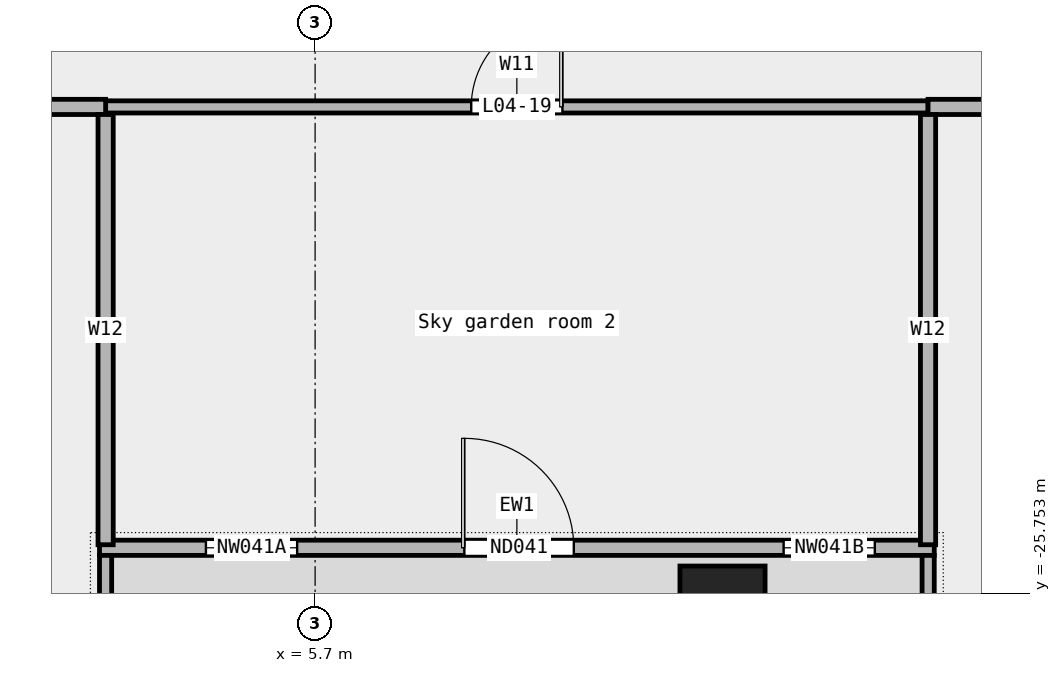
"""IFC4 building model, lengths in metres.
Left out: names, types, materials, properties, quantities, classifications, styles, units other than length and angle.
Written with IfcOpenShell. Run it as: python <this file> out.ifc"""

import sys

from ifc_helpers import new_model, si_unit, direction, frame, frame_2d, origin, origin_2d, place, context, subcontext, project, spatial, rectangle, extrude, element, fill, save


model = new_model("IFC4")
c1 = context("Model", 3, precision=1e-05, world=origin(), true_north=direction((0.0, 1.0)))
c2 = subcontext(c1, "Body", "Model", "MODEL_VIEW")
j1 = project(units=[si_unit("LENGTHUNIT", "METRE"), si_unit("PLANEANGLEUNIT", "RADIAN")], contexts=[c1])
p1 = place(None, origin())
s1 = spatial("IfcSite", under=j1, at=p1, CompositionType="ELEMENT")
p2 = place(p1, origin())
s2 = spatial("IfcBuilding", under=s1, at=p2, CompositionType="ELEMENT")
p3 = place(p2, frame((0.0, 0.0, 25.5)))
s3 = spatial("IfcBuildingStorey", under=s2, at=p3, CompositionType="ELEMENT", Elevation=25.5)
p4 = place(p3, frame((12.4, -26.0, 0.0), z_axis=(0.0, 0.0, 1.0), x_axis=(1.0, 0.0, 0.0)))
e1 = element("IfcColumn", 1, at=p4, inside=s3, PredefinedType="COLUMN", context=c2, shape_type="SweptSolid", body=[
    extrude(rectangle(XDim=1.4, YDim=1.4, at=origin_2d()), origin(), (0.0, 0.0, 1.0), 5.05),
])
p5 = place(p3, frame((2.155, -25.0, 0.0), z_axis=(0.0, 0.0, 1.0), x_axis=(1.0, 0.0, 0.0)))
e2 = element("IfcWall", 2, at=p5, inside=s3, PredefinedType="STANDARD", context=c2, shape_type="SweptSolid", body=[
    extrude(rectangle(XDim=13.727, YDim=0.25, at=frame_2d((6.864, 0.0))), origin(), (0.0, 0.0, 1.0), 5.05),
])
p6 = place(p5, frame((1.75, 0.0, 0.45)))
e3 = element("IfcOpeningElement", 3, at=p6, cuts=e2, PredefinedType="OPENING", context=c2, shape_type="SweptSolid", body=[
    extrude(rectangle(XDim=1.5, YDim=3.0, at=frame_2d((0.75, 1.5))), frame((0.0, 0.137, 0.0), z_axis=(0.0, -1.0, 0.0), x_axis=(1.0, 0.0, 0.0)), (0.0, 0.0, 1.0), 0.274),
])
p7 = place(p5, frame((6.0, 0.0, 0.0)))
e4 = element("IfcOpeningElement", 4, at=p7, cuts=e2, PredefinedType="OPENING", context=c2, shape_type="SweptSolid", body=[
    extrude(rectangle(XDim=1.8, YDim=2.4, at=frame_2d((0.9, 1.2))), frame((0.0, 0.137, 0.0), z_axis=(0.0, -1.0, 0.0), x_axis=(1.0, 0.0, 0.0)), (0.0, 0.0, 1.0), 0.274),
])
p8 = place(p5, frame((11.25, 0.0, 0.45)))
e5 = element("IfcOpeningElement", 5, at=p8, cuts=e2, PredefinedType="OPENING", context=c2, shape_type="SweptSolid", body=[
    extrude(rectangle(XDim=1.5, YDim=3.0, at=frame_2d((0.75, 1.5))), frame((0.0, 0.137, 0.0), z_axis=(0.0, -1.0, 0.0), x_axis=(1.0, 0.0, 0.0)), (0.0, 0.0, 1.0), 0.274),
])
for number, where, z_axis, x_axis in (
    (6, (2.255, -27.0, 0.0), (0.0, 0.0, 1.0), (0.0, 1.0, 0.0)),
    (7, (15.782, -27.0, 0.0), (0.0, 0.0, 1.0), (0.0, 1.0, 0.0)),
):
    element("IfcWall", number, at=place(p3, frame(where, z_axis=z_axis, x_axis=x_axis)), inside=s3, PredefinedType="STANDARD", context=c2, shape_type="SweptSolid", body=[
        extrude(rectangle(XDim=1.875, YDim=0.2, at=frame_2d((0.938, 0.0))), origin(), (0.0, 0.0, 1.0), 5.05),
    ])
p9 = place(p3, frame((2.255, -17.75, 0.0), z_axis=(0.0, 0.0, 1.0), x_axis=(1.0, 0.0, 0.0)))
e8 = element("IfcWall", 8, at=p9, inside=s3, PredefinedType="PARTITIONING", context=c2, shape_type="SweptSolid", body=[
    extrude(rectangle(XDim=13.525, YDim=0.2, at=frame_2d((6.763, 0.0))), origin(), (0.0, 0.0, 1.0), 5.05),
])
p10 = place(p9, frame((6.012, 0.0, 0.0)))
e9 = element("IfcOpeningElement", 9, at=p10, cuts=e8, PredefinedType="OPENING", context=c2, shape_type="SweptSolid", body=[
    extrude(rectangle(XDim=1.5, YDim=2.1, at=frame_2d((0.75, 1.05))), frame((0.0, 0.112, 0.0), z_axis=(0.0, -1.0, 0.0), x_axis=(1.0, 0.0, 0.0)), (0.0, 0.0, 1.0), 0.224),
])
p11 = place(p3, frame((-30.75, -17.75, 0.0), z_axis=(0.0, 0.0, 1.0), x_axis=(1.0, 0.0, 0.0)))
e10 = element("IfcWall", 10, at=p11, inside=s3, PredefinedType="PARTITIONING", context=c2, shape_type="SweptSolid", body=[
    extrude(rectangle(XDim=33.005, YDim=0.25, at=frame_2d((16.502, 0.0))), origin(), (0.0, 0.0, 1.0), 5.05),
])
p12 = place(p11, frame((27.752, 0.0, 0.0)))
e11 = element("IfcOpeningElement", 11, at=p12, cuts=e10, PredefinedType="OPENING", context=c2, shape_type="SweptSolid", body=[
    extrude(rectangle(XDim=1.2, YDim=2.1, at=frame_2d((0.6, 1.05))), frame((0.0, 0.137, 0.0), z_axis=(0.0, -1.0, 0.0), x_axis=(1.0, 0.0, 0.0)), (0.0, 0.0, 1.0), 0.274),
])
p13 = place(p11, frame((11.05, 0.0, 0.0)))
e12 = element("IfcOpeningElement", 12, at=p13, cuts=e10, PredefinedType="OPENING", context=c2, shape_type="SweptSolid", body=[
    extrude(rectangle(XDim=1.8, YDim=2.1, at=frame_2d((0.9, 1.05))), frame((0.0, 0.137, 0.0), z_axis=(0.0, -1.0, 0.0), x_axis=(1.0, 0.0, 0.0)), (0.0, 0.0, 1.0), 0.274),
])
p14 = place(p3, frame((15.78, -17.75, 0.0), z_axis=(0.0, 0.0, 1.0), x_axis=(1.0, 0.0, 0.0)))
e13 = element("IfcWall", 13, at=p14, inside=s3, PredefinedType="PARTITIONING", context=c2, shape_type="SweptSolid", body=[
    extrude(rectangle(XDim=14.97, YDim=0.25, at=frame_2d((7.485, 0.0))), origin(), (0.0, 0.0, 1.0), 5.05),
])
p15 = place(p14, frame((6.485, 0.0, 0.0)))
e14 = element("IfcOpeningElement", 14, at=p15, cuts=e13, PredefinedType="OPENING", context=c2, shape_type="SweptSolid", body=[
    extrude(rectangle(XDim=1.8, YDim=2.1, at=frame_2d((0.9, 1.05))), frame((0.0, 0.137, 0.0), z_axis=(0.0, -1.0, 0.0), x_axis=(1.0, 0.0, 0.0)), (0.0, 0.0, 1.0), 0.274),
])
for number, where, z_axis, x_axis in (
    (15, (2.255, -24.95, 0.0), (0.0, 0.0, 1.0), (0.0, 1.0, 0.0)),
    (16, (15.78, -24.95, 0.0), (0.0, 0.0, 1.0), (0.0, 1.0, 0.0)),
):
    element("IfcWall", number, at=place(p3, frame(where, z_axis=z_axis, x_axis=x_axis)), inside=s3, PredefinedType="PARTITIONING", context=c2, shape_type="SweptSolid", body=[
        extrude(rectangle(XDim=7.075, YDim=0.25, at=frame_2d((3.538, 0.0))), origin(), (0.0, 0.0, 1.0), 5.05),
    ])
p16 = place(p6, origin())
e17 = element("IfcWindow", 17, at=p16, inside=s3, PartitioningType="SINGLE_PANEL", PredefinedType="WINDOW", context=c2, shape_type="SweptSolid", body=[
    extrude(rectangle(XDim=1.5, YDim=3.0, at=frame_2d((0.75, 1.5))), frame((0.0, 0.03, 0.0), z_axis=(0.0, -1.0, 0.0), x_axis=(1.0, 0.0, 0.0)), (0.0, 0.0, 1.0), 0.06),
])
fill(e3, e17)
p17 = place(p7, origin())
e18 = element("IfcDoor", 18, at=p17, inside=s3, OperationType="DOUBLE_DOOR_SINGLE_SWING", PredefinedType="DOOR", context=c2, shape_type="SweptSolid", body=[
    extrude(rectangle(XDim=1.8, YDim=2.4, at=frame_2d((0.9, 1.2))), frame((0.0, 0.025, 0.0), z_axis=(0.0, -1.0, 0.0), x_axis=(1.0, 0.0, 0.0)), (0.0, 0.0, 1.0), 0.05),
])
fill(e4, e18)
p18 = place(p8, origin())
e19 = element("IfcWindow", 19, at=p18, inside=s3, PartitioningType="SINGLE_PANEL", PredefinedType="WINDOW", context=c2, shape_type="SweptSolid", body=[
    extrude(rectangle(XDim=1.5, YDim=3.0, at=frame_2d((0.75, 1.5))), frame((0.0, 0.03, 0.0), z_axis=(0.0, -1.0, 0.0), x_axis=(1.0, 0.0, 0.0)), (0.0, 0.0, 1.0), 0.06),
])
fill(e5, e19)
p19 = place(p10, origin())
e20 = element("IfcDoor", 20, at=p19, inside=s3, OperationType="DOUBLE_DOOR_SINGLE_SWING", PredefinedType="DOOR", context=c2, shape_type="SweptSolid", body=[
    extrude(rectangle(XDim=1.5, YDim=2.1, at=frame_2d((0.75, 1.05))), frame((0.0, 0.025, 0.0), z_axis=(0.0, -1.0, 0.0), x_axis=(1.0, 0.0, 0.0)), (0.0, 0.0, 1.0), 0.05),
])
fill(e9, e20)
save(model, sys.argv[1])
